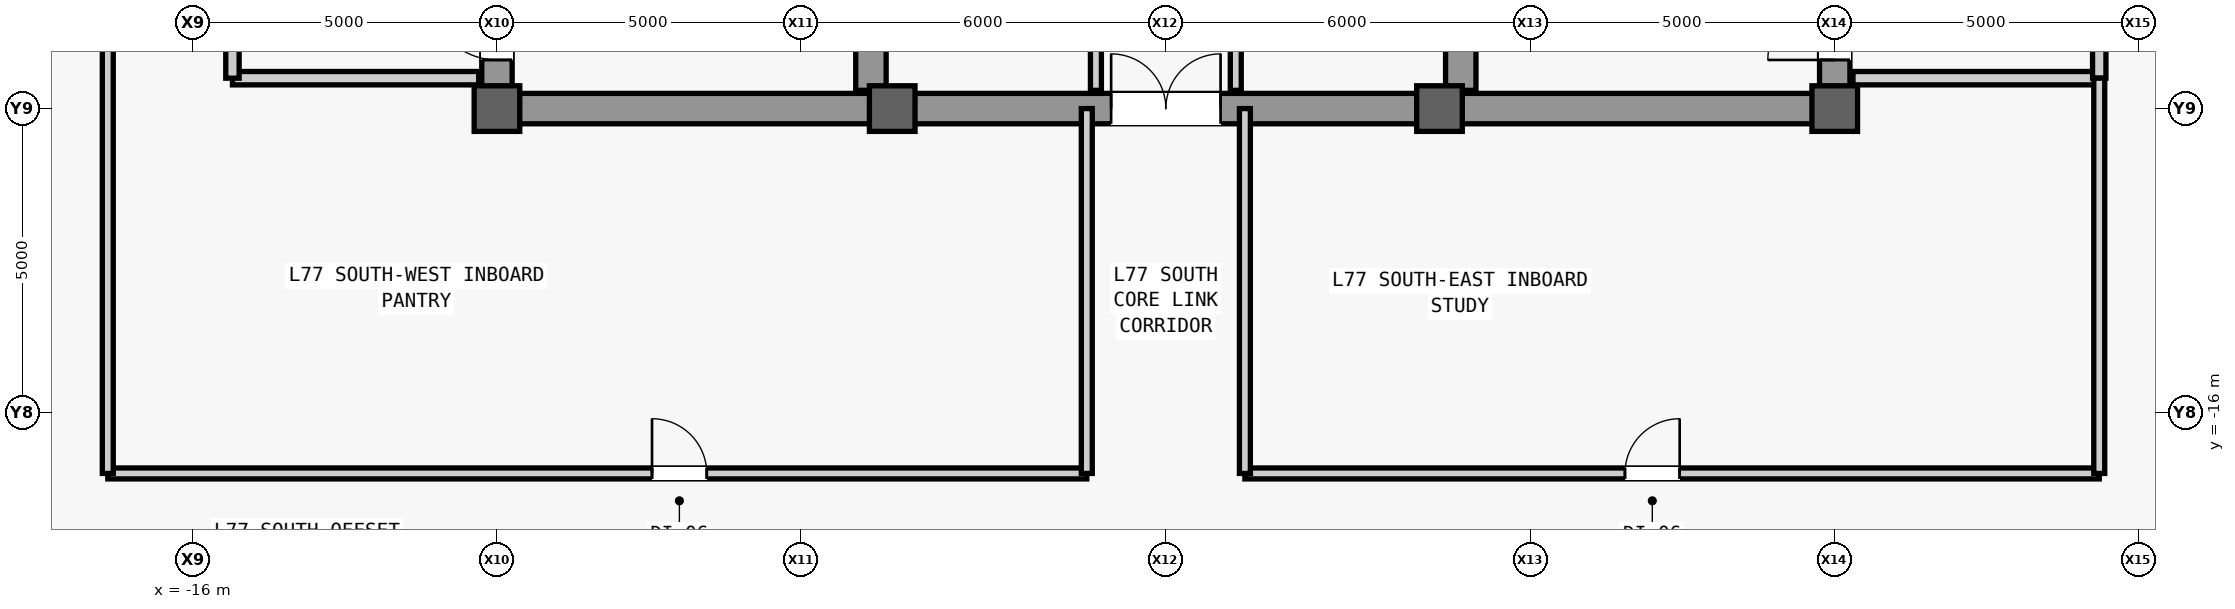
"""IFC4 building model, lengths in metres.
Left out: names, types, materials, properties, quantities, classifications, styles, units other than length and angle.
Written with IfcOpenShell. Run it as: python <this file> out.ifc"""

import sys

from ifc_helpers import new_model, si_unit, direction, frame, frame_2d, origin, origin_2d, place, context, subcontext, project, spatial, rectangle, extrude, source, transform, mapped, element, fill, save


model = new_model("IFC4")
c1 = context("Model", 3, precision=1e-05, world=origin(), true_north=direction((0.0, 1.0)))
c2 = subcontext(c1, "Body", "Model", "MODEL_VIEW")
j1 = project(units=[si_unit("LENGTHUNIT", "METRE"), si_unit("PLANEANGLEUNIT", "RADIAN")], contexts=[c1])
p1 = place(None, origin())
s1 = spatial("IfcSite", under=j1, at=p1, CompositionType="ELEMENT")
p2 = place(p1, origin())
s2 = spatial("IfcBuilding", under=s1, at=p2, CompositionType="ELEMENT")
p3 = place(p2, frame((0.0, 0.0, 326.3)))
s3 = spatial("IfcBuildingStorey", under=s2, at=p3, CompositionType="ELEMENT", Elevation=326.3)
m1 = source(origin(), c2, "Body", "SweptSolid", [
    extrude(rectangle(XDim=22.0, YDim=0.5, at=frame_2d((11.0, 0.0))), origin(), (0.0, 0.0, 1.0), 3.74),
])
p4 = place(p3, frame((-11.0, -11.0, 0.0), z_axis=(0.0, 0.0, 1.0), x_axis=(0.0, 1.0, 0.0)))
e1 = element("IfcWall", 1, at=p4, inside=s3, PredefinedType="SHEAR", context=c2, shape_type="MappedRepresentation", body=[
    mapped(m1, transform((0.0, 0.0, 0.0), scale=1.0)),
])
m2 = source(origin(), c2, "Body", "SweptSolid", [
    extrude(rectangle(XDim=1.1, YDim=2.2, at=frame_2d((0.55, 1.1))), frame((0.0, 0.26, 0.0), z_axis=(0.0, -1.0, 0.0), x_axis=(1.0, 0.0, 0.0)), (0.0, 0.0, 1.0), 0.52),
])
p5 = place(p4, frame((0.8, 0.0, 0.0)))
e2 = element("IfcOpeningElement", 2, at=p5, cuts=e1, PredefinedType="OPENING", context=c2, shape_type="MappedRepresentation", body=[
    mapped(m2, transform((0.0, 0.0, 0.0), scale=1.0)),
])
p6 = place(p4, frame((12.5, 0.0, 0.0)))
e3 = element("IfcOpeningElement", 3, at=p6, cuts=e1, PredefinedType="OPENING", context=c2, shape_type="MappedRepresentation", body=[
    mapped(m2, transform((0.0, 0.0, 0.0), scale=1.0)),
])
m3 = source(origin(), c2, "Body", "SweptSolid", [
    extrude(rectangle(XDim=0.9, YDim=2.15, at=frame_2d((0.45, 1.075))), frame((0.0, 0.26, 0.0), z_axis=(0.0, -1.0, 0.0), x_axis=(1.0, 0.0, 0.0)), (0.0, 0.0, 1.0), 0.52),
])
p7 = place(p4, frame((7.575, 0.0, 0.0)))
e4 = element("IfcOpeningElement", 4, at=p7, cuts=e1, PredefinedType="OPENING", context=c2, shape_type="MappedRepresentation", body=[
    mapped(m3, transform((0.0, 0.0, 0.0), scale=1.0)),
])
m4 = source(origin(), c2, "Body", "SweptSolid", [
    extrude(rectangle(XDim=1.2, YDim=2.3, at=frame_2d((0.6, 1.15))), frame((0.0, 0.26, 0.0), z_axis=(0.0, -1.0, 0.0), x_axis=(1.0, 0.0, 0.0)), (0.0, 0.0, 1.0), 0.52),
])
p8 = place(p4, frame((14.6, 0.0, 0.0)))
e5 = element("IfcOpeningElement", 5, at=p8, cuts=e1, PredefinedType="OPENING", context=c2, shape_type="MappedRepresentation", body=[
    mapped(m4, transform((0.0, 0.0, 0.0), scale=1.0)),
])
p9 = place(p4, frame((18.2, 0.0, 0.0)))
e6 = element("IfcOpeningElement", 6, at=p9, cuts=e1, PredefinedType="OPENING", context=c2, shape_type="MappedRepresentation", body=[
    mapped(m4, transform((0.0, 0.0, 0.0), scale=1.0)),
])
m5 = source(origin(), c2, "Body", "SweptSolid", [
    extrude(rectangle(XDim=1.3, YDim=2.3, at=frame_2d((0.65, 1.15))), frame((0.0, 0.26, 0.0), z_axis=(0.0, -1.0, 0.0), x_axis=(1.0, 0.0, 0.0)), (0.0, 0.0, 1.0), 0.52),
])
p10 = place(p4, frame((2.7, 0.0, 0.0)))
e7 = element("IfcOpeningElement", 7, at=p10, cuts=e1, PredefinedType="OPENING", context=c2, shape_type="MappedRepresentation", body=[
    mapped(m5, transform((0.0, 0.0, 0.0), scale=1.0)),
])
p11 = place(p3, frame((11.0, -11.0, 0.0), z_axis=(0.0, 0.0, 1.0), x_axis=(0.0, 1.0, 0.0)))
e8 = element("IfcWall", 8, at=p11, inside=s3, PredefinedType="SHEAR", context=c2, shape_type="MappedRepresentation", body=[
    mapped(m1, transform((0.0, 0.0, 0.0), scale=1.0)),
])
p12 = place(p11, frame((0.8, 0.0, 0.0)))
e9 = element("IfcOpeningElement", 9, at=p12, cuts=e8, PredefinedType="OPENING", context=c2, shape_type="MappedRepresentation", body=[
    mapped(m2, transform((0.0, 0.0, 0.0), scale=1.0)),
])
p13 = place(p11, frame((7.575, 0.0, 0.0)))
e10 = element("IfcOpeningElement", 10, at=p13, cuts=e8, PredefinedType="OPENING", context=c2, shape_type="MappedRepresentation", body=[
    mapped(m3, transform((0.0, 0.0, 0.0), scale=1.0)),
])
p14 = place(p11, frame((17.6, 0.0, 0.0)))
e11 = element("IfcOpeningElement", 11, at=p14, cuts=e8, PredefinedType="OPENING", context=c2, shape_type="MappedRepresentation", body=[
    mapped(m4, transform((0.0, 0.0, 0.0), scale=1.0)),
])
p15 = place(p11, frame((19.6, 0.0, 0.0)))
e12 = element("IfcOpeningElement", 12, at=p15, cuts=e8, PredefinedType="OPENING", context=c2, shape_type="MappedRepresentation", body=[
    mapped(m4, transform((0.0, 0.0, 0.0), scale=1.0)),
])
p16 = place(p11, frame((2.7, 0.0, 0.0)))
e13 = element("IfcOpeningElement", 13, at=p16, cuts=e8, PredefinedType="OPENING", context=c2, shape_type="MappedRepresentation", body=[
    mapped(m5, transform((0.0, 0.0, 0.0), scale=1.0)),
])
p17 = place(p11, frame((13.35, 0.0, 0.0)))
e14 = element("IfcOpeningElement", 14, at=p17, cuts=e8, PredefinedType="OPENING", context=c2, shape_type="MappedRepresentation", body=[
    mapped(m5, transform((0.0, 0.0, 0.0), scale=1.0)),
])
m6 = source(origin(), c2, "Body", "SweptSolid", [
    extrude(rectangle(XDim=21.4, YDim=0.5, at=frame_2d((10.7, 0.0))), origin(), (0.0, 0.0, 1.0), 3.74),
])
for number, where, z_axis, x_axis in (
    (15, (-4.85, -10.7, 0.0), (0.0, 0.0, 1.0), (0.0, 1.0, 0.0)),
    (16, (4.85, -10.7, 0.0), (0.0, 0.0, 1.0), (0.0, 1.0, 0.0)),
):
    element("IfcWall", number, at=place(p3, frame(where, z_axis=z_axis, x_axis=x_axis)), inside=s3, PredefinedType="SHEAR", context=c2, shape_type="MappedRepresentation", body=[
        mapped(m6, transform((0.0, 0.0, 0.0), scale=1.0)),
    ])
m7 = source(origin(), c2, "Body", "SweptSolid", [
    extrude(rectangle(XDim=5.9, YDim=0.5, at=frame_2d((2.95, 0.0))), origin(), (0.0, 0.0, 1.0), 3.74),
])
for number, where, z_axis, x_axis in (
    (17, (-10.75, -11.0, 0.0), (0.0, 0.0, 1.0), (1.0, 0.0, 0.0)),
    (18, (4.85, -11.0, 0.0), (0.0, 0.0, 1.0), (1.0, 0.0, 0.0)),
):
    element("IfcWall", number, at=place(p3, frame(where, z_axis=z_axis, x_axis=x_axis)), inside=s3, PredefinedType="SHEAR", context=c2, shape_type="MappedRepresentation", body=[
        mapped(m7, transform((0.0, 0.0, 0.0), scale=1.0)),
    ])
m8 = source(origin(), c2, "Body", "SweptSolid", [
    extrude(rectangle(XDim=9.2, YDim=0.5, at=frame_2d((4.6, 0.0))), origin(), (0.0, 0.0, 1.0), 3.74),
])
p18 = place(p3, frame((-4.6, -11.0, 0.0), z_axis=(0.0, 0.0, 1.0), x_axis=(1.0, 0.0, 0.0)))
e19 = element("IfcWall", 19, at=p18, inside=s3, PredefinedType="SHEAR", context=c2, shape_type="MappedRepresentation", body=[
    mapped(m8, transform((0.0, 0.0, 0.0), scale=1.0)),
])
m9 = source(origin(), c2, "Body", "SweptSolid", [
    extrude(rectangle(XDim=1.8, YDim=2.25, at=frame_2d((0.9, 1.125))), frame((0.0, 0.26, 0.0), z_axis=(0.0, -1.0, 0.0), x_axis=(1.0, 0.0, 0.0)), (0.0, 0.0, 1.0), 0.52),
])
p19 = place(p18, frame((3.7, 0.0, 0.0)))
e20 = element("IfcOpeningElement", 20, at=p19, cuts=e19, PredefinedType="OPENING", context=c2, shape_type="MappedRepresentation", body=[
    mapped(m9, transform((0.0, 0.0, 0.0), scale=1.0)),
])
m10 = source(origin(), c2, "Body", "SweptSolid", [
    extrude(rectangle(XDim=0.75, YDim=0.75, at=origin_2d()), origin(), (0.0, 0.0, 1.0), 4.0),
])
for number, where, z_axis, x_axis in (
    (21, (-11.0, -11.0, 0.0), (0.0, 0.0, 1.0), (1.0, 0.0, 0.0)),
    (22, (-4.5, -11.0, 0.0), (0.0, 0.0, 1.0), (1.0, 0.0, 0.0)),
    (23, (4.5, -11.0, 0.0), (0.0, 0.0, 1.0), (1.0, 0.0, 0.0)),
    (24, (11.0, -11.0, 0.0), (0.0, 0.0, 1.0), (1.0, 0.0, 0.0)),
):
    element("IfcColumn", number, at=place(p3, frame(where, z_axis=z_axis, x_axis=x_axis)), inside=s3, PredefinedType="COLUMN", context=c2, shape_type="MappedRepresentation", body=[
        mapped(m10, transform((0.0, 0.0, 0.0), scale=1.0)),
    ])
m11 = source(origin(), c2, "Body", "SweptSolid", [
    extrude(rectangle(XDim=4.05, YDim=0.22, at=frame_2d((2.025, 0.0))), origin(), (0.0, 0.0, 1.0), 3.74),
])
p20 = place(p3, frame((-15.35, -10.5, 0.0), z_axis=(0.0, 0.0, 1.0), x_axis=(1.0, 0.0, 0.0)))
e25 = element("IfcWall", 25, at=p20, inside=s3, PredefinedType="PARTITIONING", context=c2, shape_type="MappedRepresentation", body=[
    mapped(m11, transform((0.0, 0.0, 0.0), scale=1.0)),
])
m12 = source(origin(), c2, "Body", "SweptSolid", [
    extrude(rectangle(XDim=4.4, YDim=0.22, at=frame_2d((2.2, 0.0))), origin(), (0.0, 0.0, 1.0), 3.74),
])
p21 = place(p3, frame((-15.35, -10.5, 0.0), z_axis=(0.0, 0.0, 1.0), x_axis=(0.0, 1.0, 0.0)))
e26 = element("IfcWall", 26, at=p21, inside=s3, PredefinedType="PARTITIONING", context=c2, shape_type="MappedRepresentation", body=[
    mapped(m12, transform((0.0, 0.0, 0.0), scale=1.0)),
])
m13 = source(origin(), c2, "Body", "SweptSolid", [
    extrude(rectangle(XDim=1.2, YDim=2.2, at=frame_2d((0.6, 1.1))), frame((0.0, 0.12, 0.0), z_axis=(0.0, -1.0, 0.0), x_axis=(1.0, 0.0, 0.0)), (0.0, 0.0, 1.0), 0.24),
])
p22 = place(p21, frame((1.6, 0.0, 0.0)))
e27 = element("IfcOpeningElement", 27, at=p22, cuts=e26, PredefinedType="OPENING", context=c2, shape_type="MappedRepresentation", body=[
    mapped(m13, transform((0.0, 0.0, 0.0), scale=1.0)),
])
p23 = place(p3, frame((11.3, -10.5, 0.0), z_axis=(0.0, 0.0, 1.0), x_axis=(1.0, 0.0, 0.0)))
e28 = element("IfcWall", 28, at=p23, inside=s3, PredefinedType="PARTITIONING", context=c2, shape_type="MappedRepresentation", body=[
    mapped(m11, transform((0.0, 0.0, 0.0), scale=1.0)),
])
p24 = place(p3, frame((15.35, -10.5, 0.0), z_axis=(0.0, 0.0, 1.0), x_axis=(0.0, 1.0, 0.0)))
e29 = element("IfcWall", 29, at=p24, inside=s3, PredefinedType="PARTITIONING", context=c2, shape_type="MappedRepresentation", body=[
    mapped(m12, transform((0.0, 0.0, 0.0), scale=1.0)),
])
p25 = place(p24, frame((1.6, 0.0, 0.0)))
e30 = element("IfcOpeningElement", 30, at=p25, cuts=e29, PredefinedType="OPENING", context=c2, shape_type="MappedRepresentation", body=[
    mapped(m13, transform((0.0, 0.0, 0.0), scale=1.0)),
])
m14 = source(origin(), c2, "Body", "SweptSolid", [
    extrude(rectangle(XDim=5.4, YDim=0.18, at=frame_2d((2.7, 0.0))), origin(), (0.0, 0.0, 1.0), 3.74),
])
p26 = place(p3, frame((-1.15, -10.7, 0.0), z_axis=(0.0, 0.0, 1.0), x_axis=(0.0, 1.0, 0.0)))
e31 = element("IfcWall", 31, at=p26, inside=s3, PredefinedType="PARTITIONING", context=c2, shape_type="MappedRepresentation", body=[
    mapped(m14, transform((0.0, 0.0, 0.0), scale=1.0)),
])
m15 = source(origin(), c2, "Body", "SweptSolid", [
    extrude(rectangle(XDim=0.9, YDim=2.15, at=frame_2d((0.45, 1.075))), frame((0.0, 0.1, 0.0), z_axis=(0.0, -1.0, 0.0), x_axis=(1.0, 0.0, 0.0)), (0.0, 0.0, 1.0), 0.2),
])
p27 = place(p26, frame((1.15, 0.0, 0.0)))
e32 = element("IfcOpeningElement", 32, at=p27, cuts=e31, PredefinedType="OPENING", context=c2, shape_type="MappedRepresentation", body=[
    mapped(m15, transform((0.0, 0.0, 0.0), scale=1.0)),
])
p28 = place(p26, frame((3.85, 0.0, 0.0)))
e33 = element("IfcOpeningElement", 33, at=p28, cuts=e31, PredefinedType="OPENING", context=c2, shape_type="MappedRepresentation", body=[
    mapped(m15, transform((0.0, 0.0, 0.0), scale=1.0)),
])
p29 = place(p3, frame((1.15, -10.7, 0.0), z_axis=(0.0, 0.0, 1.0), x_axis=(0.0, 1.0, 0.0)))
e34 = element("IfcWall", 34, at=p29, inside=s3, PredefinedType="PARTITIONING", context=c2, shape_type="MappedRepresentation", body=[
    mapped(m14, transform((0.0, 0.0, 0.0), scale=1.0)),
])
p30 = place(p29, frame((2.25, 0.0, 0.0)))
e35 = element("IfcOpeningElement", 35, at=p30, cuts=e34, PredefinedType="OPENING", context=c2, shape_type="MappedRepresentation", body=[
    mapped(m15, transform((0.0, 0.0, 0.0), scale=1.0)),
])
m16 = source(origin(), c2, "Body", "SweptSolid", [
    extrude(rectangle(XDim=16.1, YDim=0.18, at=frame_2d((8.05, 0.0))), origin(), (0.0, 0.0, 1.0), 3.74),
])
p31 = place(p3, frame((-17.4, -17.0, 0.0), z_axis=(0.0, 0.0, 1.0), x_axis=(1.0, 0.0, 0.0)))
e36 = element("IfcWall", 36, at=p31, inside=s3, PredefinedType="PARTITIONING", context=c2, shape_type="MappedRepresentation", body=[
    mapped(m16, transform((0.0, 0.0, 0.0), scale=1.0)),
])
p32 = place(p31, frame((8.95, 0.0, 0.0)))
e37 = element("IfcOpeningElement", 37, at=p32, cuts=e36, PredefinedType="OPENING", context=c2, shape_type="MappedRepresentation", body=[
    mapped(m15, transform((0.0, 0.0, 0.0), scale=1.0)),
])
m17 = source(origin(), c2, "Body", "SweptSolid", [
    extrude(rectangle(XDim=7.2, YDim=0.18, at=frame_2d((3.6, 0.0))), origin(), (0.0, 0.0, 1.0), 3.74),
])
p33 = place(p3, frame((-17.4, -17.0, 0.0), z_axis=(0.0, 0.0, 1.0), x_axis=(0.0, 1.0, 0.0)))
e38 = element("IfcWall", 38, at=p33, inside=s3, PredefinedType="PARTITIONING", context=c2, shape_type="MappedRepresentation", body=[
    mapped(m17, transform((0.0, 0.0, 0.0), scale=1.0)),
])
m18 = source(origin(), c2, "Body", "SweptSolid", [
    extrude(rectangle(XDim=6.0, YDim=0.18, at=frame_2d((3.0, 0.0))), origin(), (0.0, 0.0, 1.0), 3.74),
])
p34 = place(p3, frame((-1.3, -17.0, 0.0), z_axis=(0.0, 0.0, 1.0), x_axis=(0.0, 1.0, 0.0)))
e39 = element("IfcWall", 39, at=p34, inside=s3, PredefinedType="PARTITIONING", context=c2, shape_type="MappedRepresentation", body=[
    mapped(m18, transform((0.0, 0.0, 0.0), scale=1.0)),
])
m19 = source(origin(), c2, "Body", "SweptSolid", [
    extrude(rectangle(XDim=14.05, YDim=0.18, at=frame_2d((7.025, 0.0))), origin(), (0.0, 0.0, 1.0), 3.74),
])
p35 = place(p3, frame((1.3, -17.0, 0.0), z_axis=(0.0, 0.0, 1.0), x_axis=(1.0, 0.0, 0.0)))
e40 = element("IfcWall", 40, at=p35, inside=s3, PredefinedType="PARTITIONING", context=c2, shape_type="MappedRepresentation", body=[
    mapped(m19, transform((0.0, 0.0, 0.0), scale=1.0)),
])
p36 = place(p35, frame((6.25, 0.0, 0.0)))
e41 = element("IfcOpeningElement", 41, at=p36, cuts=e40, PredefinedType="OPENING", context=c2, shape_type="MappedRepresentation", body=[
    mapped(m15, transform((0.0, 0.0, 0.0), scale=1.0)),
])
p37 = place(p3, frame((1.3, -17.0, 0.0), z_axis=(0.0, 0.0, 1.0), x_axis=(0.0, 1.0, 0.0)))
e42 = element("IfcWall", 42, at=p37, inside=s3, PredefinedType="PARTITIONING", context=c2, shape_type="MappedRepresentation", body=[
    mapped(m18, transform((0.0, 0.0, 0.0), scale=1.0)),
])
m20 = source(origin(), c2, "Body", "SweptSolid", [
    extrude(rectangle(XDim=6.5, YDim=0.18, at=frame_2d((3.25, 0.0))), origin(), (0.0, 0.0, 1.0), 3.74),
])
p38 = place(p3, frame((15.35, -17.0, 0.0), z_axis=(0.0, 0.0, 1.0), x_axis=(0.0, 1.0, 0.0)))
e43 = element("IfcWall", 43, at=p38, inside=s3, PredefinedType="PARTITIONING", context=c2, shape_type="MappedRepresentation", body=[
    mapped(m20, transform((0.0, 0.0, 0.0), scale=1.0)),
])
m21 = source(origin(), c2, "Body", "SweptSolid", [
    extrude(rectangle(XDim=1.1, YDim=2.2, at=frame_2d((0.55, 1.1))), frame((0.0, 0.025, 0.0), z_axis=(0.0, -1.0, 0.0), x_axis=(1.0, 0.0, 0.0)), (0.0, 0.0, 1.0), 0.05),
])
p39 = place(p5, origin())
e44 = element("IfcDoor", 44, at=p39, inside=s3, OperationType="SINGLE_SWING_RIGHT", PredefinedType="DOOR", context=c2, shape_type="MappedRepresentation", body=[
    mapped(m21, transform((0.0, 0.0, 0.0), scale=1.0)),
])
fill(e2, e44)
p40 = place(p12, origin())
e45 = element("IfcDoor", 45, at=p40, inside=s3, OperationType="SINGLE_SWING_LEFT", PredefinedType="DOOR", context=c2, shape_type="MappedRepresentation", body=[
    mapped(m21, transform((0.0, 0.0, 0.0), scale=1.0)),
])
fill(e9, e45)
m22 = source(origin(), c2, "Body", "SweptSolid", [
    extrude(rectangle(XDim=1.8, YDim=2.25, at=frame_2d((0.9, 1.125))), frame((0.0, 0.025, 0.0), z_axis=(0.0, -1.0, 0.0), x_axis=(1.0, 0.0, 0.0)), (0.0, 0.0, 1.0), 0.05),
])
p41 = place(p19, origin())
e46 = element("IfcDoor", 46, at=p41, inside=s3, OperationType="SINGLE_SWING_LEFT", PredefinedType="DOOR", context=c2, shape_type="MappedRepresentation", body=[
    mapped(m22, transform((0.0, 0.0, 0.0), scale=1.0)),
])
fill(e20, e46)
m23 = source(origin(), c2, "Body", "SweptSolid", [
    extrude(rectangle(XDim=0.9, YDim=2.15, at=frame_2d((0.45, 1.075))), frame((0.0, 0.025, 0.0), z_axis=(0.0, -1.0, 0.0), x_axis=(1.0, 0.0, 0.0)), (0.0, 0.0, 1.0), 0.05),
])
p42 = place(p32, origin())
e47 = element("IfcDoor", 47, at=p42, inside=s3, OperationType="SINGLE_SWING_LEFT", PredefinedType="DOOR", context=c2, shape_type="MappedRepresentation", body=[
    mapped(m23, transform((0.0, 0.0, 0.0), scale=1.0)),
])
fill(e37, e47)
p43 = place(p36, origin())
e48 = element("IfcDoor", 48, at=p43, inside=s3, OperationType="SINGLE_SWING_RIGHT", PredefinedType="DOOR", context=c2, shape_type="MappedRepresentation", body=[
    mapped(m23, transform((0.0, 0.0, 0.0), scale=1.0)),
])
fill(e41, e48)
save(model, sys.argv[1])
